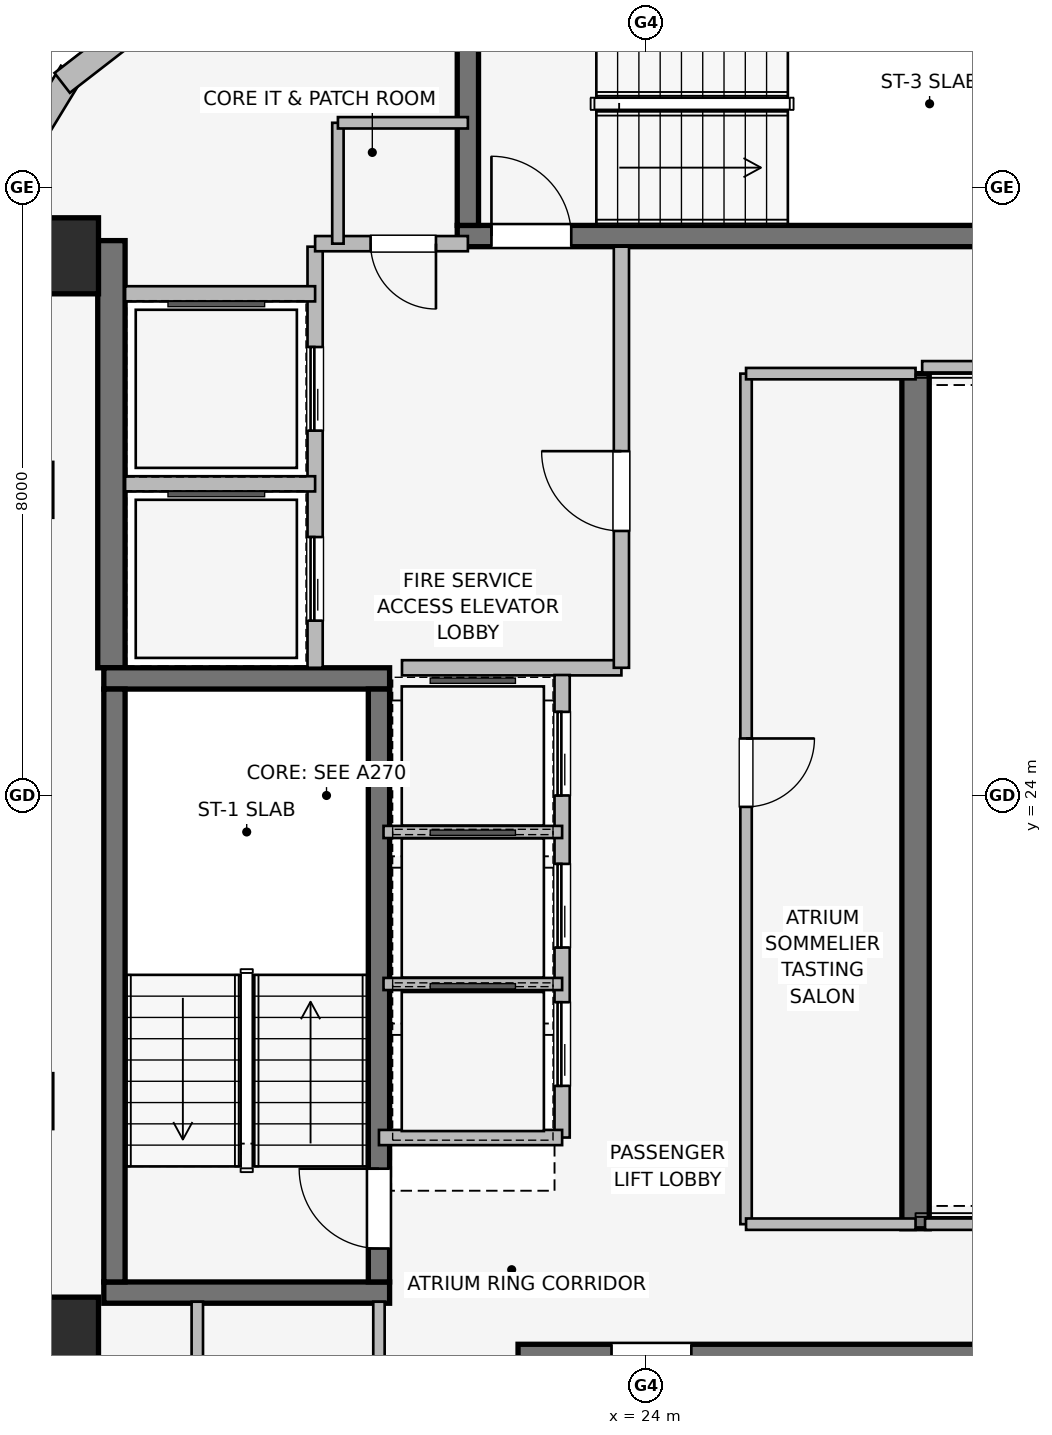
"""IFC4 building model, lengths in metres.
Left out: names, types, materials, properties, quantities, classifications, styles, units other than length and angle.
Written with IfcOpenShell. Run it as: python <this file> out.ifc"""

import sys

from ifc_helpers import new_model, si_unit, direction, frame, frame_2d, origin, origin_2d, place, context, subcontext, project, spatial, rectangle, extrude, element, fill, save


model = new_model("IFC4")
c1 = context("Model", 3, precision=1e-05, world=origin(), true_north=direction((0.0, 1.0)))
c2 = subcontext(c1, "Body", "Model", "MODEL_VIEW")
j1 = project(units=[si_unit("LENGTHUNIT", "METRE"), si_unit("PLANEANGLEUNIT", "RADIAN")], contexts=[c1])
p1 = place(None, origin())
s1 = spatial("IfcSite", under=j1, at=p1, CompositionType="ELEMENT")
p2 = place(p1, origin())
s2 = spatial("IfcBuilding", under=s1, at=p2, CompositionType="ELEMENT")
p3 = place(p2, frame((0.0, 0.0, 249.0)))
s3 = spatial("IfcBuildingStorey", under=s2, at=p3, CompositionType="ELEMENT", Elevation=249.0)
p4 = place(p3, frame((16.97, 25.68, 0.0), z_axis=(0.0, 0.0, 1.0), x_axis=(0.0, 1.0, 0.0)))
e1 = element("IfcWall", 1, at=p4, inside=s3, PredefinedType="SHEAR", context=c2, shape_type="SweptSolid", body=[
    extrude(rectangle(XDim=5.62, YDim=0.36, at=frame_2d((2.81, 0.0))), origin(), (0.0, 0.0, 1.0), 3.55),
])
p5 = place(p3, frame((27.55, 29.55, 0.0), z_axis=(0.0, 0.0, 1.0), x_axis=(0.0, -1.0, 0.0)))
e2 = element("IfcWall", 2, at=p5, inside=s3, PredefinedType="SHEAR", context=c2, shape_type="SweptSolid", body=[
    extrude(rectangle(XDim=11.25, YDim=0.36, at=frame_2d((5.625, 0.0))), origin(), (0.0, 0.0, 1.0), 3.55),
])
for number, where, z_axis, x_axis in (
    (3, (16.87, 17.46, 0.0), (0.0, 0.0, 1.0), (1.0, 0.0, 0.0)),
    (4, (20.63, 25.54, 0.0), (0.0, 0.0, 1.0), (-1.0, 0.0, 0.0)),
):
    element("IfcWall", number, at=place(p3, frame(where, z_axis=z_axis, x_axis=x_axis)), inside=s3, PredefinedType="SHEAR", context=c2, shape_type="SweptSolid", body=[
        extrude(rectangle(XDim=3.76, YDim=0.28, at=frame_2d((1.88, 0.0))), origin(), (0.0, 0.0, 1.0), 3.55),
    ])
p6 = place(p3, frame((17.01, 25.4, 0.0), z_axis=(0.0, 0.0, 1.0), x_axis=(0.0, -1.0, 0.0)))
e5 = element("IfcWall", 5, at=p6, inside=s3, PredefinedType="SHEAR", context=c2, shape_type="SweptSolid", body=[
    extrude(rectangle(XDim=7.8, YDim=0.28, at=frame_2d((3.9, 0.0))), origin(), (0.0, 0.0, 1.0), 3.55),
])
p7 = place(p3, frame((20.49, 17.6, 0.0), z_axis=(0.0, 0.0, 1.0), x_axis=(0.0, 1.0, 0.0)))
e6 = element("IfcWall", 6, at=p7, inside=s3, PredefinedType="SHEAR", context=c2, shape_type="SweptSolid", body=[
    extrude(rectangle(XDim=7.8, YDim=0.28, at=frame_2d((3.9, 0.0))), origin(), (0.0, 0.0, 1.0), 3.55),
])
p8 = place(p7, frame((0.44, 0.0, 0.0)))
e7 = element("IfcOpeningElement", 7, at=p8, cuts=e6, PredefinedType="OPENING", context=c2, shape_type="SweptSolid", body=[
    extrude(rectangle(XDim=1.05, YDim=2.0, at=frame_2d((0.525, 1.0))), frame((0.0, 0.15, 0.0), z_axis=(0.0, -1.0, 0.0), x_axis=(1.0, 0.0, 0.0)), (0.0, 0.0, 1.0), 0.3),
])
p9 = place(p3, frame((30.68, 16.64, 0.0), z_axis=(0.0, 0.0, 1.0), x_axis=(-1.0, 0.0, 0.0)))
e8 = element("IfcWall", 8, at=p9, inside=s3, PredefinedType="SHEAR", context=c2, shape_type="SweptSolid", body=[
    extrude(rectangle(XDim=8.36, YDim=0.28, at=frame_2d((4.18, 0.0))), origin(), (0.0, 0.0, 1.0), 3.55),
])
p10 = place(p9, frame((6.08, 0.0, 0.0)))
e9 = element("IfcOpeningElement", 9, at=p10, cuts=e8, PredefinedType="OPENING", context=c2, shape_type="SweptSolid", body=[
    extrude(rectangle(XDim=1.05, YDim=2.0, at=frame_2d((0.525, 1.0))), frame((0.0, 0.15, 0.0), z_axis=(0.0, -1.0, 0.0), x_axis=(1.0, 0.0, 0.0)), (0.0, 0.0, 1.0), 0.3),
])
p11 = place(p3, frame((21.52, 31.36, 0.0), z_axis=(0.0, 0.0, 1.0), x_axis=(1.0, 0.0, 0.0)))
e10 = element("IfcWall", 10, at=p11, inside=s3, PredefinedType="SHEAR", context=c2, shape_type="SweptSolid", body=[
    extrude(rectangle(XDim=8.36, YDim=0.28, at=frame_2d((4.18, 0.0))), origin(), (0.0, 0.0, 1.0), 3.55),
])
p12 = place(p11, frame((0.45, 0.0, 0.0)))
e11 = element("IfcOpeningElement", 11, at=p12, cuts=e10, PredefinedType="OPENING", context=c2, shape_type="SweptSolid", body=[
    extrude(rectangle(XDim=1.05, YDim=2.0, at=frame_2d((0.525, 1.0))), frame((0.0, 0.15, 0.0), z_axis=(0.0, -1.0, 0.0), x_axis=(1.0, 0.0, 0.0)), (0.0, 0.0, 1.0), 0.3),
])
p13 = place(p3, frame((21.66, 34.7, 0.0), z_axis=(0.0, 0.0, 1.0), x_axis=(0.0, -1.0, 0.0)))
e12 = element("IfcWall", 12, at=p13, inside=s3, PredefinedType="SHEAR", context=c2, shape_type="SweptSolid", body=[
    extrude(rectangle(XDim=3.2, YDim=0.28, at=frame_2d((1.6, 0.0))), origin(), (0.0, 0.0, 1.0), 3.55),
])
for number, where, z_axis, x_axis in (
    (13, (16.3, 16.9, 0.0), (0.0, 0.0, 1.0), (1.0, 0.0, 0.0)),
    (14, (16.3, 31.1, 0.0), (0.0, 0.0, 1.0), (1.0, 0.0, 0.0)),
):
    element("IfcColumn", number, at=place(p3, frame(where, z_axis=z_axis, x_axis=x_axis)), inside=s3, PredefinedType="COLUMN", context=c2, shape_type="SweptSolid", body=[
        extrude(rectangle(XDim=1.0, YDim=1.0, at=origin_2d()), origin(), (0.0, 0.0, 1.0), 3.55),
    ])
p14 = place(p3, frame((15.574, 32.082, 0.0), z_axis=(0.0, 0.0, 1.0), x_axis=(0.520325409202, 0.853968072318, 0.0)))
e15 = element("IfcWall", 15, at=p14, inside=s3, PredefinedType="STANDARD", context=c2, shape_type="SweptSolid", body=[
    extrude(rectangle(XDim=1.678, YDim=0.33, at=frame_2d((0.839, 0.0))), origin(), (0.0, 0.0, 1.0), 3.29),
])
p15 = place(p3, frame((16.322, 33.375, 0.0), z_axis=(0.0, 0.0, 1.0), x_axis=(0.790691856293, 0.61221433207, 0.0)))
e16 = element("IfcWall", 16, at=p15, inside=s3, PredefinedType="STANDARD", context=c2, shape_type="SweptSolid", body=[
    extrude(rectangle(XDim=1.676, YDim=0.33, at=frame_2d((0.838, 0.0))), origin(), (0.0, 0.0, 1.0), 3.29),
])
p16 = place(p3, frame((19.65, 25.68, 0.0), z_axis=(0.0, 0.0, 1.0), x_axis=(0.0, 1.0, 0.0)))
e17 = element("IfcWall", 17, at=p16, inside=s3, PredefinedType="PARTITIONING", context=c2, shape_type="SweptSolid", body=[
    extrude(rectangle(XDim=5.54, YDim=0.2, at=frame_2d((2.77, 0.0))), origin(), (0.0, 0.0, 1.0), 3.29),
])
p17 = place(p16, frame((0.62, 0.0, 0.0)))
e18 = element("IfcOpeningElement", 18, at=p17, cuts=e17, PredefinedType="OPENING", context=c2, shape_type="SweptSolid", body=[
    extrude(rectangle(XDim=1.1, YDim=2.2, at=frame_2d((0.55, 1.1))), frame((0.0, 0.11, 0.0), z_axis=(0.0, -1.0, 0.0), x_axis=(1.0, 0.0, 0.0)), (0.0, 0.0, 1.0), 0.22),
])
p18 = place(p16, frame((3.12, 0.0, 0.0)))
e19 = element("IfcOpeningElement", 19, at=p18, cuts=e17, PredefinedType="OPENING", context=c2, shape_type="SweptSolid", body=[
    extrude(rectangle(XDim=1.1, YDim=2.2, at=frame_2d((0.55, 1.1))), frame((0.0, 0.11, 0.0), z_axis=(0.0, -1.0, 0.0), x_axis=(1.0, 0.0, 0.0)), (0.0, 0.0, 1.0), 0.22),
])
p19 = place(p3, frame((20.793, 25.68, 0.0), z_axis=(0.0, 0.0, 1.0), x_axis=(1.0, 0.0, 0.0)))
e20 = element("IfcWall", 20, at=p19, inside=s3, PredefinedType="PARTITIONING", context=c2, shape_type="SweptSolid", body=[
    extrude(rectangle(XDim=2.887, YDim=0.2, at=frame_2d((1.443, 0.0))), origin(), (0.0, 0.0, 1.0), 3.29),
])
p20 = place(p3, frame((23.68, 25.68, 0.0), z_axis=(0.0, 0.0, 1.0), x_axis=(0.0, 1.0, 0.0)))
e21 = element("IfcWall", 21, at=p20, inside=s3, PredefinedType="PARTITIONING", context=c2, shape_type="SweptSolid", body=[
    extrude(rectangle(XDim=5.54, YDim=0.2, at=frame_2d((2.77, 0.0))), origin(), (0.0, 0.0, 1.0), 3.29),
])
p21 = place(p20, frame((1.8, 0.0, 0.0)))
e22 = element("IfcOpeningElement", 22, at=p21, cuts=e21, PredefinedType="OPENING", context=c2, shape_type="SweptSolid", body=[
    extrude(rectangle(XDim=1.05, YDim=2.0, at=frame_2d((0.525, 1.0))), frame((0.0, 0.11, 0.0), z_axis=(0.0, -1.0, 0.0), x_axis=(1.0, 0.0, 0.0)), (0.0, 0.0, 1.0), 0.22),
])
p22 = place(p3, frame((21.66, 31.26, 0.0), z_axis=(0.0, 0.0, 1.0), x_axis=(-1.0, 0.0, 0.0)))
e23 = element("IfcWall", 23, at=p22, inside=s3, PredefinedType="PARTITIONING", context=c2, shape_type="SweptSolid", body=[
    extrude(rectangle(XDim=2.01, YDim=0.2, at=frame_2d((1.005, 0.0))), origin(), (0.0, 0.0, 1.0), 3.29),
])
p23 = place(p22, frame((0.42, 0.0, 0.0)))
e24 = element("IfcOpeningElement", 24, at=p23, cuts=e23, PredefinedType="OPENING", context=c2, shape_type="SweptSolid", body=[
    extrude(rectangle(XDim=0.86, YDim=2.0, at=frame_2d((0.43, 1.0))), frame((0.0, 0.11, 0.0), z_axis=(0.0, -1.0, 0.0), x_axis=(1.0, 0.0, 0.0)), (0.0, 0.0, 1.0), 0.22),
])
p24 = place(p3, frame((17.15, 28.1, 0.0), z_axis=(0.0, 0.0, 1.0), x_axis=(1.0, 0.0, 0.0)))
e25 = element("IfcWall", 25, at=p24, inside=s3, PredefinedType="PARTITIONING", context=c2, shape_type="SweptSolid", body=[
    extrude(rectangle(XDim=2.5, YDim=0.2, at=frame_2d((1.25, 0.0))), origin(), (0.0, 0.0, 1.0), 3.29),
])
p25 = place(p3, frame((19.65, 30.6, 0.0), z_axis=(0.0, 0.0, 1.0), x_axis=(-1.0, 0.0, 0.0)))
e26 = element("IfcWall", 26, at=p25, inside=s3, PredefinedType="PARTITIONING", context=c2, shape_type="SweptSolid", body=[
    extrude(rectangle(XDim=2.5, YDim=0.2, at=frame_2d((1.25, 0.0))), origin(), (0.0, 0.0, 1.0), 2.19),
])
p26 = place(p3, frame((22.9, 19.5, 0.0), z_axis=(0.0, 0.0, 1.0), x_axis=(0.0, 1.0, 0.0)))
e27 = element("IfcWall", 27, at=p26, inside=s3, PredefinedType="PARTITIONING", context=c2, shape_type="SweptSolid", body=[
    extrude(rectangle(XDim=6.085, YDim=0.2, at=frame_2d((3.042, 0.0))), origin(), (0.0, 0.0, 1.0), 3.29),
])
p27 = place(p26, frame((0.68, 0.0, 0.0)))
e28 = element("IfcOpeningElement", 28, at=p27, cuts=e27, PredefinedType="OPENING", context=c2, shape_type="SweptSolid", body=[
    extrude(rectangle(XDim=1.1, YDim=2.2, at=frame_2d((0.55, 1.1))), frame((0.0, 0.11, 0.0), z_axis=(0.0, -1.0, 0.0), x_axis=(1.0, 0.0, 0.0)), (0.0, 0.0, 1.0), 0.22),
])
p28 = place(p26, frame((2.5, 0.0, 0.0)))
e29 = element("IfcOpeningElement", 29, at=p28, cuts=e27, PredefinedType="OPENING", context=c2, shape_type="SweptSolid", body=[
    extrude(rectangle(XDim=1.1, YDim=2.2, at=frame_2d((0.55, 1.1))), frame((0.0, 0.11, 0.0), z_axis=(0.0, -1.0, 0.0), x_axis=(1.0, 0.0, 0.0)), (0.0, 0.0, 1.0), 0.22),
])
p29 = place(p26, frame((4.5, 0.0, 0.0)))
e30 = element("IfcOpeningElement", 30, at=p29, cuts=e27, PredefinedType="OPENING", context=c2, shape_type="SweptSolid", body=[
    extrude(rectangle(XDim=1.1, YDim=2.2, at=frame_2d((0.55, 1.1))), frame((0.0, 0.11, 0.0), z_axis=(0.0, -1.0, 0.0), x_axis=(1.0, 0.0, 0.0)), (0.0, 0.0, 1.0), 0.22),
])
p30 = place(p3, frame((20.49, 19.5, 0.0), z_axis=(0.0, 0.0, 1.0), x_axis=(1.0, 0.0, 0.0)))
e31 = element("IfcWall", 31, at=p30, inside=s3, PredefinedType="PARTITIONING", context=c2, shape_type="SweptSolid", body=[
    extrude(rectangle(XDim=2.41, YDim=0.2, at=frame_2d((1.205, 0.0))), origin(), (0.0, 0.0, 1.0), 2.19),
])
for number, where, z_axis, x_axis in (
    (32, (20.55, 21.52, 0.0), (0.0, 0.0, 1.0), (1.0, 0.0, 0.0)),
    (33, (20.55, 23.52, 0.0), (0.0, 0.0, 1.0), (1.0, 0.0, 0.0)),
):
    element("IfcWall", number, at=place(p3, frame(where, z_axis=z_axis, x_axis=x_axis)), inside=s3, PredefinedType="PARTITIONING", context=c2, shape_type="SweptSolid", body=[
        extrude(rectangle(XDim=2.35, YDim=0.16, at=frame_2d((1.175, 0.0))), origin(), (0.0, 0.0, 1.0), 3.29),
    ])
p31 = place(p3, frame((25.32, 29.55, 0.0), z_axis=(0.0, 0.0, 1.0), x_axis=(0.0, -1.0, 0.0)))
e34 = element("IfcWall", 34, at=p31, inside=s3, PredefinedType="PARTITIONING", context=c2, shape_type="SweptSolid", body=[
    extrude(rectangle(XDim=11.19, YDim=0.15, at=frame_2d((5.595, 0.0))), origin(), (0.0, 0.0, 1.0), 3.29),
])
p32 = place(p31, frame((4.8, 0.0, 0.0)))
e35 = element("IfcOpeningElement", 35, at=p32, cuts=e34, PredefinedType="OPENING", context=c2, shape_type="SweptSolid", body=[
    extrude(rectangle(XDim=0.9, YDim=2.0, at=frame_2d((0.45, 1.0))), frame((0.0, 0.085, 0.0), z_axis=(0.0, -1.0, 0.0), x_axis=(1.0, 0.0, 0.0)), (0.0, 0.0, 1.0), 0.17),
])
p33 = place(p3, frame((25.32, 18.36, 0.0), z_axis=(0.0, 0.0, 1.0), x_axis=(1.0, 0.0, 0.0)))
e36 = element("IfcWall", 36, at=p33, inside=s3, PredefinedType="PARTITIONING", context=c2, shape_type="SweptSolid", body=[
    extrude(rectangle(XDim=2.23, YDim=0.15, at=frame_2d((1.115, 0.0))), origin(), (0.0, 0.0, 1.0), 3.29),
])
p34 = place(p3, frame((27.55, 29.55, 0.0), z_axis=(0.0, 0.0, 1.0), x_axis=(-1.0, 0.0, 0.0)))
e37 = element("IfcWall", 37, at=p34, inside=s3, PredefinedType="PARTITIONING", context=c2, shape_type="SweptSolid", body=[
    extrude(rectangle(XDim=2.23, YDim=0.15, at=frame_2d((1.115, 0.0))), origin(), (0.0, 0.0, 1.0), 2.19),
])
p35 = place(p3, frame((18.1, 17.34, 0.0), z_axis=(0.0, 0.0, 1.0), x_axis=(0.0, -1.0, 0.0)))
e38 = element("IfcWall", 38, at=p35, inside=s3, PredefinedType="PARTITIONING", context=c2, shape_type="SweptSolid", body=[
    extrude(rectangle(XDim=4.133, YDim=0.15, at=frame_2d((2.066, 0.0))), origin(), (0.0, 0.0, 1.0), 3.29),
])
p36 = place(p3, frame((20.49, 13.2, 0.0), z_axis=(0.0, 0.0, 1.0), x_axis=(0.0, 1.0, 0.0)))
e39 = element("IfcWall", 39, at=p36, inside=s3, PredefinedType="PARTITIONING", context=c2, shape_type="SweptSolid", body=[
    extrude(rectangle(XDim=4.14, YDim=0.15, at=frame_2d((2.07, 0.0))), origin(), (0.0, 0.0, 1.0), 3.29),
])
p37 = place(p36, frame((1.25, 0.0, 0.0)))
e40 = element("IfcOpeningElement", 40, at=p37, cuts=e39, PredefinedType="OPENING", context=c2, shape_type="SweptSolid", body=[
    extrude(rectangle(XDim=0.9, YDim=2.0, at=frame_2d((0.45, 1.0))), frame((0.0, 0.085, 0.0), z_axis=(0.0, -1.0, 0.0), x_axis=(1.0, 0.0, 0.0)), (0.0, 0.0, 1.0), 0.17),
])
p38 = place(p3, frame((19.95, 32.85, 0.0), z_axis=(0.0, 0.0, 1.0), x_axis=(0.0, -1.0, 0.0)))
e41 = element("IfcWall", 41, at=p38, inside=s3, PredefinedType="PARTITIONING", context=c2, shape_type="SweptSolid", body=[
    extrude(rectangle(XDim=1.59, YDim=0.15, at=frame_2d((0.795, 0.0))), origin(), (0.0, 0.0, 1.0), 3.29),
])
p39 = place(p3, frame((21.66, 32.85, 0.0), z_axis=(0.0, 0.0, 1.0), x_axis=(-1.0, 0.0, 0.0)))
e42 = element("IfcWall", 42, at=p39, inside=s3, PredefinedType="PARTITIONING", context=c2, shape_type="SweptSolid", body=[
    extrude(rectangle(XDim=1.71, YDim=0.15, at=frame_2d((0.855, 0.0))), origin(), (0.0, 0.0, 1.0), 3.29),
])
p40 = place(p3, frame((27.675, 18.36, 0.0), z_axis=(0.0, 0.0, 1.0), x_axis=(1.0, 0.0, 0.0)))
e43 = element("IfcWall", 43, at=p40, inside=s3, PredefinedType="PARTITIONING", context=c2, shape_type="SweptSolid", body=[
    extrude(rectangle(XDim=12.165, YDim=0.15, at=frame_2d((6.083, 0.0))), origin(), (0.0, 0.0, 1.0), 2.431),
])
p41 = place(p3, frame((39.84, 29.64, 0.0), z_axis=(0.0, 0.0, 1.0), x_axis=(-1.0, 0.0, 0.0)))
e44 = element("IfcWall", 44, at=p41, inside=s3, PredefinedType="PARTITIONING", context=c2, shape_type="SweptSolid", body=[
    extrude(rectangle(XDim=12.203, YDim=0.15, at=frame_2d((6.102, 0.0))), origin(), (0.0, 0.0, 1.0), 2.431),
])
p42 = place(p8, origin())
e45 = element("IfcDoor", 45, at=p42, inside=s3, OperationType="SINGLE_SWING_RIGHT", PredefinedType="DOOR", context=c2, shape_type="SweptSolid", body=[
    extrude(rectangle(XDim=1.05, YDim=2.0, at=frame_2d((0.525, 1.0))), frame((0.0, 0.025, 0.0), z_axis=(0.0, -1.0, 0.0), x_axis=(1.0, 0.0, 0.0)), (0.0, 0.0, 1.0), 0.05),
])
fill(e7, e45)
p43 = place(p10, origin())
e46 = element("IfcDoor", 46, at=p43, inside=s3, OperationType="SINGLE_SWING_RIGHT", PredefinedType="DOOR", context=c2, shape_type="SweptSolid", body=[
    extrude(rectangle(XDim=1.05, YDim=2.0, at=frame_2d((0.525, 1.0))), frame((0.0, 0.025, 0.0), z_axis=(0.0, -1.0, 0.0), x_axis=(1.0, 0.0, 0.0)), (0.0, 0.0, 1.0), 0.05),
])
fill(e9, e46)
p44 = place(p12, origin())
e47 = element("IfcDoor", 47, at=p44, inside=s3, OperationType="SINGLE_SWING_LEFT", PredefinedType="DOOR", context=c2, shape_type="SweptSolid", body=[
    extrude(rectangle(XDim=1.05, YDim=2.0, at=frame_2d((0.525, 1.0))), frame((0.0, 0.025, 0.0), z_axis=(0.0, -1.0, 0.0), x_axis=(1.0, 0.0, 0.0)), (0.0, 0.0, 1.0), 0.05),
])
fill(e11, e47)
p45 = place(p17, origin())
e48 = element("IfcDoor", 48, at=p45, inside=s3, OperationType="SLIDING_TO_LEFT", PredefinedType="DOOR", context=c2, shape_type="SweptSolid", body=[
    extrude(rectangle(XDim=1.1, YDim=2.2, at=frame_2d((0.55, 1.1))), frame((0.0, 0.025, 0.0), z_axis=(0.0, -1.0, 0.0), x_axis=(1.0, 0.0, 0.0)), (0.0, 0.0, 1.0), 0.05),
])
fill(e18, e48)
p46 = place(p18, origin())
e49 = element("IfcDoor", 49, at=p46, inside=s3, OperationType="SLIDING_TO_LEFT", PredefinedType="DOOR", context=c2, shape_type="SweptSolid", body=[
    extrude(rectangle(XDim=1.1, YDim=2.2, at=frame_2d((0.55, 1.1))), frame((0.0, 0.025, 0.0), z_axis=(0.0, -1.0, 0.0), x_axis=(1.0, 0.0, 0.0)), (0.0, 0.0, 1.0), 0.05),
])
fill(e19, e49)
p47 = place(p21, origin())
e50 = element("IfcDoor", 50, at=p47, inside=s3, OperationType="SINGLE_SWING_RIGHT", PredefinedType="DOOR", context=c2, shape_type="SweptSolid", body=[
    extrude(rectangle(XDim=1.05, YDim=2.0, at=frame_2d((0.525, 1.0))), frame((0.0, 0.025, 0.0), z_axis=(0.0, -1.0, 0.0), x_axis=(1.0, 0.0, 0.0)), (0.0, 0.0, 1.0), 0.05),
])
fill(e22, e50)
p48 = place(p23, origin())
e51 = element("IfcDoor", 51, at=p48, inside=s3, OperationType="SINGLE_SWING_LEFT", PredefinedType="DOOR", context=c2, shape_type="SweptSolid", body=[
    extrude(rectangle(XDim=0.86, YDim=2.0, at=frame_2d((0.43, 1.0))), frame((0.0, 0.025, 0.0), z_axis=(0.0, -1.0, 0.0), x_axis=(1.0, 0.0, 0.0)), (0.0, 0.0, 1.0), 0.05),
])
fill(e24, e51)
p49 = place(p27, origin())
e52 = element("IfcDoor", 52, at=p49, inside=s3, OperationType="SLIDING_TO_LEFT", PredefinedType="DOOR", context=c2, shape_type="SweptSolid", body=[
    extrude(rectangle(XDim=1.1, YDim=2.2, at=frame_2d((0.55, 1.1))), frame((0.0, 0.025, 0.0), z_axis=(0.0, -1.0, 0.0), x_axis=(1.0, 0.0, 0.0)), (0.0, 0.0, 1.0), 0.05),
])
fill(e28, e52)
p50 = place(p28, origin())
e53 = element("IfcDoor", 53, at=p50, inside=s3, OperationType="SLIDING_TO_LEFT", PredefinedType="DOOR", context=c2, shape_type="SweptSolid", body=[
    extrude(rectangle(XDim=1.1, YDim=2.2, at=frame_2d((0.55, 1.1))), frame((0.0, 0.025, 0.0), z_axis=(0.0, -1.0, 0.0), x_axis=(1.0, 0.0, 0.0)), (0.0, 0.0, 1.0), 0.05),
])
fill(e29, e53)
p51 = place(p29, origin())
e54 = element("IfcDoor", 54, at=p51, inside=s3, OperationType="SLIDING_TO_LEFT", PredefinedType="DOOR", context=c2, shape_type="SweptSolid", body=[
    extrude(rectangle(XDim=1.1, YDim=2.2, at=frame_2d((0.55, 1.1))), frame((0.0, 0.025, 0.0), z_axis=(0.0, -1.0, 0.0), x_axis=(1.0, 0.0, 0.0)), (0.0, 0.0, 1.0), 0.05),
])
fill(e30, e54)
p52 = place(p32, origin())
e55 = element("IfcDoor", 55, at=p52, inside=s3, OperationType="SINGLE_SWING_LEFT", PredefinedType="DOOR", context=c2, shape_type="SweptSolid", body=[
    extrude(rectangle(XDim=0.9, YDim=2.0, at=frame_2d((0.45, 1.0))), frame((0.0, 0.025, 0.0), z_axis=(0.0, -1.0, 0.0), x_axis=(1.0, 0.0, 0.0)), (0.0, 0.0, 1.0), 0.05),
])
fill(e35, e55)
save(model, sys.argv[1])
